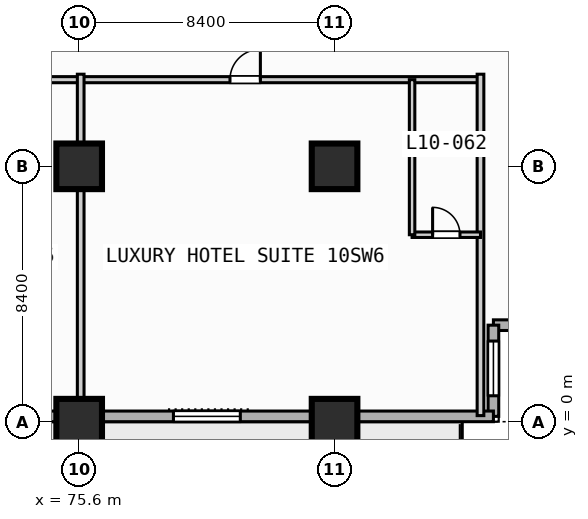
"""IFC4 building model, lengths in metres.
Left out: names, types, materials, properties, quantities, classifications, styles, units other than length and angle.
Written with IfcOpenShell. Run it as: python <this file> out.ifc"""

import sys

from ifc_helpers import new_model, si_unit, direction, frame, frame_2d, origin, origin_2d, place, context, subcontext, project, spatial, rectangle, extrude, element, fill, save


model = new_model("IFC4")
c1 = context("Model", 3, precision=1e-05, world=origin(), true_north=direction((0.0, 1.0)))
c2 = subcontext(c1, "Body", "Model", "MODEL_VIEW")
j1 = project(units=[si_unit("LENGTHUNIT", "METRE"), si_unit("PLANEANGLEUNIT", "RADIAN")], contexts=[c1])
p1 = place(None, origin())
s1 = spatial("IfcSite", under=j1, at=p1, CompositionType="ELEMENT")
p2 = place(p1, origin())
s2 = spatial("IfcBuilding", under=s1, at=p2, CompositionType="ELEMENT")
p3 = place(p2, frame((0.0, 0.0, 47.2)))
s3 = spatial("IfcBuildingStorey", under=s2, at=p3, CompositionType="ELEMENT", Elevation=47.2)
for number, where, z_axis, x_axis in (
    (1, (75.6, 0.0, 0.0), (0.0, 0.0, 1.0), (1.0, 0.0, 0.0)),
    (2, (75.6, 8.4, 0.0), (0.0, 0.0, 1.0), (1.0, 0.0, 0.0)),
    (3, (84.0, 0.0, 0.0), (0.0, 0.0, 1.0), (1.0, 0.0, 0.0)),
    (4, (84.0, 8.4, 0.0), (0.0, 0.0, 1.0), (1.0, 0.0, 0.0)),
):
    element("IfcColumn", number, at=place(p3, frame(where, z_axis=z_axis, x_axis=x_axis)), inside=s3, PredefinedType="COLUMN", context=c2, shape_type="SweptSolid", body=[
        extrude(rectangle(XDim=1.5, YDim=1.5, at=origin_2d()), origin(), (0.0, 0.0, 1.0), 3.8),
    ])
p4 = place(p3, frame((92.225, 3.175, 0.0), z_axis=(0.0, 0.0, 1.0), x_axis=(-1.0, 0.0, 0.0)))
e5 = element("IfcWall", 5, at=p4, inside=s3, PredefinedType="STANDARD", context=c2, shape_type="SweptSolid", body=[
    extrude(rectangle(XDim=3.0, YDim=0.35, at=frame_2d((1.5, 0.0))), origin(), (0.0, 0.0, 1.0), 3.55),
])
p5 = place(p3, frame((89.225, 3.175, 0.0), z_axis=(0.0, 0.0, 1.0), x_axis=(0.0, -1.0, 0.0)))
e6 = element("IfcWall", 6, at=p5, inside=s3, PredefinedType="STANDARD", context=c2, shape_type="SweptSolid", body=[
    extrude(rectangle(XDim=3.0, YDim=0.35, at=frame_2d((1.5, 0.0))), origin(), (0.0, 0.0, 1.0), 3.55),
])
p6 = place(p5, frame((0.522, 0.0, 0.85)))
e7 = element("IfcOpeningElement", 7, at=p6, cuts=e6, PredefinedType="OPENING", context=c2, shape_type="SweptSolid", body=[
    extrude(rectangle(XDim=1.8, YDim=1.8, at=frame_2d((0.9, 0.9))), frame((0.0, 0.185, 0.0), z_axis=(0.0, -1.0, 0.0), x_axis=(1.0, 0.0, 0.0)), (0.0, 0.0, 1.0), 0.37),
])
p7 = place(p3, frame((89.225, 0.175, 0.0), z_axis=(0.0, 0.0, 1.0), x_axis=(-1.0, 0.0, 0.0)))
e8 = element("IfcWall", 8, at=p7, inside=s3, PredefinedType="STANDARD", context=c2, shape_type="SweptSolid", body=[
    extrude(rectangle(XDim=86.05, YDim=0.35, at=frame_2d((43.025, 0.0))), origin(), (0.0, 0.0, 1.0), 3.55),
])
p8 = place(p7, frame((67.525, 0.0, 0.0)))
e9 = element("IfcOpeningElement", 9, at=p8, cuts=e8, PredefinedType="OPENING", context=c2, shape_type="SweptSolid", body=[
    extrude(rectangle(XDim=1.4, YDim=2.2, at=frame_2d((0.7, 1.1))), frame((0.0, 0.185, 0.0), z_axis=(0.0, -1.0, 0.0), x_axis=(1.0, 0.0, 0.0)), (0.0, 0.0, 1.0), 0.37),
])
p9 = place(p7, frame((58.725, 0.0, 0.85)))
e10 = element("IfcOpeningElement", 10, at=p9, cuts=e8, PredefinedType="OPENING", context=c2, shape_type="SweptSolid", body=[
    extrude(rectangle(XDim=2.2, YDim=1.8, at=frame_2d((1.1, 0.9))), frame((0.0, 0.185, 0.0), z_axis=(0.0, -1.0, 0.0), x_axis=(1.0, 0.0, 0.0)), (0.0, 0.0, 1.0), 0.37),
])
p10 = place(p7, frame((41.925, 0.0, 0.85)))
e11 = element("IfcOpeningElement", 11, at=p10, cuts=e8, PredefinedType="OPENING", context=c2, shape_type="SweptSolid", body=[
    extrude(rectangle(XDim=2.2, YDim=1.8, at=frame_2d((1.1, 0.9))), frame((0.0, 0.185, 0.0), z_axis=(0.0, -1.0, 0.0), x_axis=(1.0, 0.0, 0.0)), (0.0, 0.0, 1.0), 0.37),
])
p11 = place(p7, frame((33.525, 0.0, 0.85)))
e12 = element("IfcOpeningElement", 12, at=p11, cuts=e8, PredefinedType="OPENING", context=c2, shape_type="SweptSolid", body=[
    extrude(rectangle(XDim=2.2, YDim=1.8, at=frame_2d((1.1, 0.9))), frame((0.0, 0.185, 0.0), z_axis=(0.0, -1.0, 0.0), x_axis=(1.0, 0.0, 0.0)), (0.0, 0.0, 1.0), 0.37),
])
p12 = place(p7, frame((16.725, 0.0, 0.85)))
e13 = element("IfcOpeningElement", 13, at=p12, cuts=e8, PredefinedType="OPENING", context=c2, shape_type="SweptSolid", body=[
    extrude(rectangle(XDim=2.2, YDim=1.8, at=frame_2d((1.1, 0.9))), frame((0.0, 0.185, 0.0), z_axis=(0.0, -1.0, 0.0), x_axis=(1.0, 0.0, 0.0)), (0.0, 0.0, 1.0), 0.37),
])
p13 = place(p7, frame((8.325, 0.0, 0.85)))
e14 = element("IfcOpeningElement", 14, at=p13, cuts=e8, PredefinedType="OPENING", context=c2, shape_type="SweptSolid", body=[
    extrude(rectangle(XDim=2.2, YDim=1.8, at=frame_2d((1.1, 0.9))), frame((0.0, 0.185, 0.0), z_axis=(0.0, -1.0, 0.0), x_axis=(1.0, 0.0, 0.0)), (0.0, 0.0, 1.0), 0.37),
])
p14 = place(p3, frame((13.65, 11.25, 0.0), z_axis=(0.0, 0.0, 1.0), x_axis=(1.0, 0.0, 0.0)))
e15 = element("IfcWall", 15, at=p14, inside=s3, PredefinedType="PARTITIONING", context=c2, shape_type="SweptSolid", body=[
    extrude(rectangle(XDim=75.15, YDim=0.2, at=frame_2d((37.575, 0.0))), origin(), (0.0, 0.0, 1.0), 3.55),
])
p15 = place(p14, frame((7.265, 0.0, 0.0)))
e16 = element("IfcOpeningElement", 16, at=p15, cuts=e15, PredefinedType="OPENING", context=c2, shape_type="SweptSolid", body=[
    extrude(rectangle(XDim=1.0, YDim=2.15, at=frame_2d((0.5, 1.075))), frame((0.0, 0.11, 0.0), z_axis=(0.0, -1.0, 0.0), x_axis=(1.0, 0.0, 0.0)), (0.0, 0.0, 1.0), 0.22),
])
p16 = place(p14, frame((17.135, 0.0, 0.0)))
e17 = element("IfcOpeningElement", 17, at=p16, cuts=e15, PredefinedType="OPENING", context=c2, shape_type="SweptSolid", body=[
    extrude(rectangle(XDim=1.0, YDim=2.15, at=frame_2d((0.5, 1.075))), frame((0.0, 0.11, 0.0), z_axis=(0.0, -1.0, 0.0), x_axis=(1.0, 0.0, 0.0)), (0.0, 0.0, 1.0), 0.22),
])
p17 = place(p14, frame((31.665, 0.0, 0.0)))
e18 = element("IfcOpeningElement", 18, at=p17, cuts=e15, PredefinedType="OPENING", context=c2, shape_type="SweptSolid", body=[
    extrude(rectangle(XDim=1.0, YDim=2.15, at=frame_2d((0.5, 1.075))), frame((0.0, 0.11, 0.0), z_axis=(0.0, -1.0, 0.0), x_axis=(1.0, 0.0, 0.0)), (0.0, 0.0, 1.0), 0.22),
])
p18 = place(p14, frame((41.535, 0.0, 0.0)))
e19 = element("IfcOpeningElement", 19, at=p18, cuts=e15, PredefinedType="OPENING", context=c2, shape_type="SweptSolid", body=[
    extrude(rectangle(XDim=1.0, YDim=2.15, at=frame_2d((0.5, 1.075))), frame((0.0, 0.11, 0.0), z_axis=(0.0, -1.0, 0.0), x_axis=(1.0, 0.0, 0.0)), (0.0, 0.0, 1.0), 0.22),
])
p19 = place(p14, frame((56.065, 0.0, 0.0)))
e20 = element("IfcOpeningElement", 20, at=p19, cuts=e15, PredefinedType="OPENING", context=c2, shape_type="SweptSolid", body=[
    extrude(rectangle(XDim=1.0, YDim=2.15, at=frame_2d((0.5, 1.075))), frame((0.0, 0.11, 0.0), z_axis=(0.0, -1.0, 0.0), x_axis=(1.0, 0.0, 0.0)), (0.0, 0.0, 1.0), 0.22),
])
p20 = place(p14, frame((66.91, 0.0, 0.0)))
e21 = element("IfcOpeningElement", 21, at=p20, cuts=e15, PredefinedType="OPENING", context=c2, shape_type="SweptSolid", body=[
    extrude(rectangle(XDim=1.0, YDim=2.15, at=frame_2d((0.5, 1.075))), frame((0.0, 0.11, 0.0), z_axis=(0.0, -1.0, 0.0), x_axis=(1.0, 0.0, 0.0)), (0.0, 0.0, 1.0), 0.22),
])
p21 = place(p3, frame((75.65, 0.2, 0.0), z_axis=(0.0, 0.0, 1.0), x_axis=(0.0, 1.0, 0.0)))
e22 = element("IfcWall", 22, at=p21, inside=s3, PredefinedType="PARTITIONING", context=c2, shape_type="SweptSolid", body=[
    extrude(rectangle(XDim=11.23, YDim=0.22, at=frame_2d((5.615, 0.0))), origin(), (0.0, 0.0, 1.0), 2.8),
])
p22 = place(p3, frame((88.8, 0.2, 0.0), z_axis=(0.0, 0.0, 1.0), x_axis=(0.0, 1.0, 0.0)))
e23 = element("IfcWall", 23, at=p22, inside=s3, PredefinedType="PARTITIONING", context=c2, shape_type="SweptSolid", body=[
    extrude(rectangle(XDim=11.23, YDim=0.22, at=frame_2d((5.615, 0.0))), origin(), (0.0, 0.0, 1.0), 3.55),
])
p23 = place(p3, frame((86.55, 6.15, 0.0), z_axis=(0.0, 0.0, 1.0), x_axis=(1.0, 0.0, 0.0)))
e24 = element("IfcWall", 24, at=p23, inside=s3, PredefinedType="PLUMBINGWALL", context=c2, shape_type="SweptSolid", body=[
    extrude(rectangle(XDim=2.25, YDim=0.18, at=frame_2d((1.125, 0.0))), origin(), (0.0, 0.0, 1.0), 3.55),
])
p24 = place(p23, frame((0.675, 0.0, 0.0)))
e25 = element("IfcOpeningElement", 25, at=p24, cuts=e24, PredefinedType="OPENING", context=c2, shape_type="SweptSolid", body=[
    extrude(rectangle(XDim=0.9, YDim=2.1, at=frame_2d((0.45, 1.05))), frame((0.0, 0.1, 0.0), z_axis=(0.0, -1.0, 0.0), x_axis=(1.0, 0.0, 0.0)), (0.0, 0.0, 1.0), 0.2),
])
p25 = place(p3, frame((86.55, 6.15, 0.0), z_axis=(0.0, 0.0, 1.0), x_axis=(0.0, 1.0, 0.0)))
e26 = element("IfcWall", 26, at=p25, inside=s3, PredefinedType="PLUMBINGWALL", context=c2, shape_type="SweptSolid", body=[
    extrude(rectangle(XDim=5.1, YDim=0.18, at=frame_2d((2.55, 0.0))), origin(), (0.0, 0.0, 1.0), 3.55),
])
p26 = place(p6, origin())
e27 = element("IfcWindow", 27, at=p26, inside=s3, PartitioningType="SINGLE_PANEL", PredefinedType="WINDOW", context=c2, shape_type="SweptSolid", body=[
    extrude(rectangle(XDim=1.8, YDim=1.8, at=frame_2d((0.9, 0.9))), frame((0.0, 0.03, 0.0), z_axis=(0.0, -1.0, 0.0), x_axis=(1.0, 0.0, 0.0)), (0.0, 0.0, 1.0), 0.06),
])
fill(e7, e27)
p27 = place(p13, origin())
e28 = element("IfcWindow", 28, at=p27, inside=s3, PartitioningType="SINGLE_PANEL", PredefinedType="WINDOW", context=c2, shape_type="SweptSolid", body=[
    extrude(rectangle(XDim=2.2, YDim=1.8, at=frame_2d((1.1, 0.9))), frame((0.0, 0.03, 0.0), z_axis=(0.0, -1.0, 0.0), x_axis=(1.0, 0.0, 0.0)), (0.0, 0.0, 1.0), 0.06),
])
fill(e14, e28)
p28 = place(p20, origin())
e29 = element("IfcDoor", 29, at=p28, inside=s3, OperationType="SINGLE_SWING_RIGHT", PredefinedType="DOOR", context=c2, shape_type="SweptSolid", body=[
    extrude(rectangle(XDim=1.0, YDim=2.15, at=frame_2d((0.5, 1.075))), frame((0.0, 0.025, 0.0), z_axis=(0.0, -1.0, 0.0), x_axis=(1.0, 0.0, 0.0)), (0.0, 0.0, 1.0), 0.05),
])
fill(e21, e29)
p29 = place(p24, origin())
e30 = element("IfcDoor", 30, at=p29, inside=s3, OperationType="SINGLE_SWING_LEFT", PredefinedType="DOOR", context=c2, shape_type="SweptSolid", body=[
    extrude(rectangle(XDim=0.9, YDim=2.1, at=frame_2d((0.45, 1.05))), frame((0.0, 0.025, 0.0), z_axis=(0.0, -1.0, 0.0), x_axis=(1.0, 0.0, 0.0)), (0.0, 0.0, 1.0), 0.05),
])
fill(e25, e30)
save(model, sys.argv[1])
